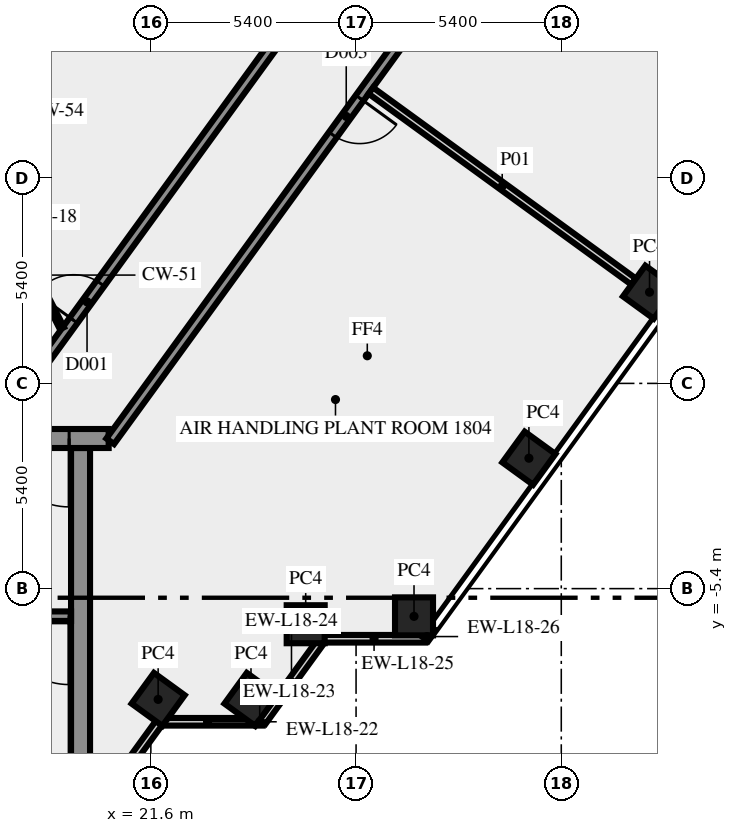
"""IFC4 building model, lengths in metres.
Left out: names, types, materials, properties, quantities, classifications, styles, units other than length and angle.
Written with IfcOpenShell. Run it as: python <this file> out.ifc"""

import sys

from ifc_helpers import new_model, si_unit, direction, frame, frame_2d, origin, origin_2d, place, context, subcontext, project, spatial, rectangle, extrude, element, fill, save


model = new_model("IFC4")
c1 = context("Model", 3, precision=1e-05, world=origin(), true_north=direction((0.0, 1.0)))
c2 = subcontext(c1, "Body", "Model", "MODEL_VIEW")
j1 = project(units=[si_unit("LENGTHUNIT", "METRE"), si_unit("PLANEANGLEUNIT", "RADIAN")], contexts=[c1])
p1 = place(None, origin())
s1 = spatial("IfcSite", under=j1, at=p1, CompositionType="ELEMENT")
p2 = place(p1, origin())
s2 = spatial("IfcBuilding", under=s1, at=p2, CompositionType="ELEMENT")
p3 = place(p2, frame((0.0, 0.0, 79.0)))
s3 = spatial("IfcBuildingStorey", under=s2, at=p3, CompositionType="ELEMENT", Elevation=79.0)
for number, where, z_axis, x_axis in (
    (1, (21.792, -8.315, 0.0), (0.0, 0.0, 1.0), (0.588, 0.809, 0.0)),
    (2, (24.235, -8.315, 0.0), (0.0, 0.0, 1.0), (0.588, 0.809, 0.0)),
    (3, (25.674, -6.337, 0.0), (0.0, 0.0, 1.0), (1.0, 0.0, 0.0)),
    (4, (28.525, -6.13, 0.0), (0.0, 0.0, 1.0), (1.0, 0.0, 0.0)),
    (5, (31.548, -1.969, 0.0), (0.0, 0.0, 1.0), (0.588, 0.809, 0.0)),
    (6, (34.722, 2.4, 0.0), (0.0, 0.0, 1.0), (0.588, 0.809, 0.0)),
):
    element("IfcColumn", number, at=place(p3, frame(where, z_axis=z_axis, x_axis=x_axis)), inside=s3, PredefinedType="COLUMN", context=c2, shape_type="SweptSolid", body=[
        extrude(rectangle(XDim=1.0, YDim=1.0, at=origin_2d()), origin(), (0.0, 0.0, 1.0), 5.65),
    ])
p4 = place(p3, frame((20.253, -11.083, 0.0), z_axis=(0.0, 0.0, 1.0), x_axis=(0.587766567315, 0.809030569476, 0.0)))
e7 = element("IfcWall", 7, at=p4, inside=s3, PredefinedType="SOLIDWALL", context=c2, shape_type="SweptSolid", body=[
    extrude(rectangle(XDim=2.688, YDim=0.2, at=frame_2d((1.344, 0.0))), origin(), (0.0, 0.0, 1.0), 5.65),
])
p5 = place(p3, frame((21.943, -8.904, 0.0), z_axis=(0.0, 0.0, 1.0), x_axis=(1.0, 0.0, 0.0)))
e8 = element("IfcWall", 8, at=p5, inside=s3, PredefinedType="SOLIDWALL", context=c2, shape_type="SweptSolid", body=[
    extrude(rectangle(XDim=2.298, YDim=0.2, at=frame_2d((1.149, 0.0))), origin(), (0.0, 0.0, 1.0), 5.65),
])
p6 = place(p3, frame((24.387, -8.904, 0.0), z_axis=(0.0, 0.0, 1.0), x_axis=(1.0, 0.0, 0.0)))
e9 = element("IfcWall", 9, at=p6, inside=s3, PredefinedType="SOLIDWALL", context=c2, shape_type="SweptSolid", body=[
    extrude(rectangle(XDim=0.156, YDim=0.2, at=frame_2d((0.078, 0.0))), origin(), (0.0, 0.0, 1.0), 5.65),
])
p7 = place(p3, frame((24.54, -8.899, 0.0), z_axis=(0.0, 0.0, 1.0), x_axis=(0.587700286833, 0.809078718578, 0.0)))
e10 = element("IfcWall", 10, at=p7, inside=s3, PredefinedType="SOLIDWALL", context=c2, shape_type="SweptSolid", body=[
    extrude(rectangle(XDim=2.587, YDim=0.2, at=frame_2d((1.293, 0.0))), origin(), (0.0, 0.0, 1.0), 5.65),
])
p8 = place(p3, frame((26.13, -6.719, 0.0), z_axis=(0.0, 0.0, 1.0), x_axis=(1.0, 0.0, 0.0)))
e11 = element("IfcWall", 11, at=p8, inside=s3, PredefinedType="SOLIDWALL", context=c2, shape_type="SweptSolid", body=[
    extrude(rectangle(XDim=2.688, YDim=0.2, at=frame_2d((1.344, 0.0))), origin(), (0.0, 0.0, 1.0), 5.65),
])
p9 = place(p3, frame((28.82, -6.724, 0.0), z_axis=(0.0, 0.0, 1.0), x_axis=(0.587611037135, 0.809143540441, 0.0)))
e12 = element("IfcWall", 12, at=p9, inside=s3, PredefinedType="SOLIDWALL", context=c2, shape_type="SweptSolid", body=[
    extrude(rectangle(XDim=0.155, YDim=0.2, at=frame_2d((0.078, 0.0))), origin(), (0.0, 0.0, 1.0), 5.65),
])
p10 = place(p3, frame((28.998, -6.48, 0.0), z_axis=(0.0, 0.0, 1.0), x_axis=(0.587785589252, 0.809016749559, 0.0)))
e13 = element("IfcWall", 13, at=p10, inside=s3, PredefinedType="SOLIDWALL", context=c2, shape_type="SweptSolid", body=[
    extrude(rectangle(XDim=28.654, YDim=0.2, at=frame_2d((14.327, 0.0))), origin(), (0.0, 0.0, 1.0), 5.65),
])
p11 = place(p3, frame((19.75, -10.5, 0.0), z_axis=(0.0, 0.0, 1.0), x_axis=(0.0, 1.0, 0.0)))
e14 = element("IfcWall", 14, at=p11, inside=s3, PredefinedType="SHEAR", context=c2, shape_type="SweptSolid", body=[
    extrude(rectangle(XDim=8.8, YDim=0.5, at=frame_2d((4.4, 0.0))), origin(), (0.0, 0.0, 1.0), 5.65),
])
p12 = place(p3, frame((19.5, -6.125, 0.0), z_axis=(0.0, 0.0, 1.0), x_axis=(-1.0, 0.0, 0.0)))
e15 = element("IfcWall", 15, at=p12, inside=s3, PredefinedType="SHEAR", context=c2, shape_type="SweptSolid", body=[
    extrude(rectangle(XDim=8.05, YDim=0.25, at=frame_2d((4.025, 0.0))), origin(), (0.0, 0.0, 1.0), 5.65),
])
p13 = place(p12, frame((0.05, 0.0, 0.0)))
e16 = element("IfcOpeningElement", 16, at=p13, cuts=e15, PredefinedType="OPENING", context=c2, shape_type="SweptSolid", body=[
    extrude(rectangle(XDim=1.8, YDim=2.1, at=frame_2d((0.9, 1.05))), frame((0.0, 0.135, 0.0), z_axis=(0.0, -1.0, 0.0), x_axis=(1.0, 0.0, 0.0)), (0.0, 0.0, 1.0), 0.27),
])
p14 = place(p3, frame((20.49, -1.45, 0.0), z_axis=(0.0, 0.0, 1.0), x_axis=(-1.0, 0.0, 0.0)))
e17 = element("IfcWall", 17, at=p14, inside=s3, PredefinedType="SHEAR", context=c2, shape_type="SweptSolid", body=[
    extrude(rectangle(XDim=40.98, YDim=0.5, at=frame_2d((20.49, 0.0))), origin(), (0.0, 0.0, 1.0), 5.65),
])
p15 = place(p14, frame((38.14, 0.0, 0.0)))
e18 = element("IfcOpeningElement", 18, at=p15, cuts=e17, PredefinedType="OPENING", context=c2, shape_type="SweptSolid", body=[
    extrude(rectangle(XDim=1.8, YDim=2.1, at=frame_2d((0.9, 1.05))), frame((0.0, 0.26, 0.0), z_axis=(0.0, -1.0, 0.0), x_axis=(1.0, 0.0, 0.0)), (0.0, 0.0, 1.0), 0.52),
])
p16 = place(p14, frame((36.728, 0.0, 0.0)))
e19 = element("IfcOpeningElement", 19, at=p16, cuts=e17, PredefinedType="OPENING", context=c2, shape_type="SweptSolid", body=[
    extrude(rectangle(XDim=0.8, YDim=2.1, at=frame_2d((0.4, 1.05))), frame((0.0, 0.26, 0.0), z_axis=(0.0, -1.0, 0.0), x_axis=(1.0, 0.0, 0.0)), (0.0, 0.0, 1.0), 0.52),
])
p17 = place(p14, frame((35.153, 0.0, 0.0)))
e20 = element("IfcOpeningElement", 20, at=p17, cuts=e17, PredefinedType="OPENING", context=c2, shape_type="SweptSolid", body=[
    extrude(rectangle(XDim=0.8, YDim=2.1, at=frame_2d((0.4, 1.05))), frame((0.0, 0.26, 0.0), z_axis=(0.0, -1.0, 0.0), x_axis=(1.0, 0.0, 0.0)), (0.0, 0.0, 1.0), 0.52),
])
p18 = place(p14, frame((32.94, 0.0, 0.0)))
e21 = element("IfcOpeningElement", 21, at=p18, cuts=e17, PredefinedType="OPENING", context=c2, shape_type="SweptSolid", body=[
    extrude(rectangle(XDim=0.9, YDim=2.1, at=frame_2d((0.45, 1.05))), frame((0.0, 0.26, 0.0), z_axis=(0.0, -1.0, 0.0), x_axis=(1.0, 0.0, 0.0)), (0.0, 0.0, 1.0), 0.52),
])
p19 = place(p14, frame((21.765, 0.0, 0.0)))
e22 = element("IfcOpeningElement", 22, at=p19, cuts=e17, PredefinedType="OPENING", context=c2, shape_type="SweptSolid", body=[
    extrude(rectangle(XDim=2.0, YDim=2.1, at=frame_2d((1.0, 1.05))), frame((0.0, 0.26, 0.0), z_axis=(0.0, -1.0, 0.0), x_axis=(1.0, 0.0, 0.0)), (0.0, 0.0, 1.0), 0.52),
])
p20 = place(p14, frame((7.14, 0.0, 0.0)))
e23 = element("IfcOpeningElement", 23, at=p20, cuts=e17, PredefinedType="OPENING", context=c2, shape_type="SweptSolid", body=[
    extrude(rectangle(XDim=0.9, YDim=2.1, at=frame_2d((0.45, 1.05))), frame((0.0, 0.26, 0.0), z_axis=(0.0, -1.0, 0.0), x_axis=(1.0, 0.0, 0.0)), (0.0, 0.0, 1.0), 0.52),
])
p21 = place(p14, frame((4.19, 0.0, 0.0)))
e24 = element("IfcOpeningElement", 24, at=p21, cuts=e17, PredefinedType="OPENING", context=c2, shape_type="SweptSolid", body=[
    extrude(rectangle(XDim=0.9, YDim=2.1, at=frame_2d((0.45, 1.05))), frame((0.0, 0.26, 0.0), z_axis=(0.0, -1.0, 0.0), x_axis=(1.0, 0.0, 0.0)), (0.0, 0.0, 1.0), 0.52),
])
p22 = place(p14, frame((1.04, 0.0, 0.0)))
e25 = element("IfcOpeningElement", 25, at=p22, cuts=e17, PredefinedType="OPENING", context=c2, shape_type="SweptSolid", body=[
    extrude(rectangle(XDim=1.8, YDim=2.1, at=frame_2d((0.9, 1.05))), frame((0.0, 0.26, 0.0), z_axis=(0.0, -1.0, 0.0), x_axis=(1.0, 0.0, 0.0)), (0.0, 0.0, 1.0), 0.52),
])
p23 = place(p3, frame((40.584, 26.078, 0.0), z_axis=(0.0, 0.0, 1.0), x_axis=(-0.587782727964, -0.809018828401, 0.0)))
e26 = element("IfcWall", 26, at=p23, inside=s3, PredefinedType="SOLIDWALL", context=c2, shape_type="SweptSolid", body=[
    extrude(rectangle(XDim=34.117, YDim=0.25, at=frame_2d((17.058, 0.0))), origin(), (0.0, 0.0, 1.0), 5.65),
])
p24 = place(p23, frame((22.951, 0.0, 0.0)))
e27 = element("IfcOpeningElement", 27, at=p24, cuts=e26, PredefinedType="OPENING", context=c2, shape_type="SweptSolid", body=[
    extrude(rectangle(XDim=1.2, YDim=2.1, at=frame_2d((0.6, 1.05))), frame((0.0, 0.135, 0.0), z_axis=(0.0, -1.0, 0.0), x_axis=(1.0, 0.0, 0.0)), (0.0, 0.0, 1.0), 0.27),
])
p25 = place(p23, frame((10.749, 0.0, 0.0)))
e28 = element("IfcOpeningElement", 28, at=p25, cuts=e26, PredefinedType="OPENING", context=c2, shape_type="SweptSolid", body=[
    extrude(rectangle(XDim=1.8, YDim=2.1, at=frame_2d((0.9, 1.05))), frame((0.0, 0.135, 0.0), z_axis=(0.0, -1.0, 0.0), x_axis=(1.0, 0.0, 0.0)), (0.0, 0.0, 1.0), 0.27),
])
p26 = place(p3, frame((17.545, -1.125, 0.0), z_axis=(0.0, 0.0, 1.0), x_axis=(0.587787785895, 0.809015153599, 0.0)))
e29 = element("IfcWall", 29, at=p26, inside=s3, PredefinedType="SOLIDWALL", context=c2, shape_type="SweptSolid", body=[
    extrude(rectangle(XDim=35.549, YDim=0.25, at=frame_2d((17.775, 0.0))), origin(), (0.0, 0.0, 1.0), 5.65),
])
p27 = place(p26, frame((33.303, 0.0, 0.0)))
e30 = element("IfcOpeningElement", 30, at=p27, cuts=e29, PredefinedType="OPENING", context=c2, shape_type="SweptSolid", body=[
    extrude(rectangle(XDim=1.2, YDim=2.1, at=frame_2d((0.6, 1.05))), frame((0.0, 0.135, 0.0), z_axis=(0.0, -1.0, 0.0), x_axis=(1.0, 0.0, 0.0)), (0.0, 0.0, 1.0), 0.27),
])
p28 = place(p26, frame((3.442, 0.0, 0.0)))
e31 = element("IfcOpeningElement", 31, at=p28, cuts=e29, PredefinedType="OPENING", context=c2, shape_type="SweptSolid", body=[
    extrude(rectangle(XDim=1.2, YDim=2.1, at=frame_2d((0.6, 1.05))), frame((0.0, 0.135, 0.0), z_axis=(0.0, -1.0, 0.0), x_axis=(1.0, 0.0, 0.0)), (0.0, 0.0, 1.0), 0.27),
])
p29 = place(p3, frame((34.302, 2.681, 0.0), z_axis=(0.0, 0.0, 1.0), x_axis=(-0.809031283368, 0.587765584678, 0.0)))
e32 = element("IfcWall", 32, at=p29, inside=s3, PredefinedType="SOLIDWALL", context=c2, shape_type="SweptSolid", body=[
    extrude(rectangle(XDim=8.545, YDim=0.2, at=frame_2d((4.272, 0.0))), origin(), (0.0, 0.0, 1.0), 5.65),
])
p30 = place(p3, frame((18.0, 3.925, 0.0), z_axis=(0.0, 0.0, 1.0), x_axis=(0.453950796792, -0.891026752736, 0.0)))
e33 = element("IfcWall", 33, at=p30, inside=s3, PredefinedType="PARTITIONING", context=c2, shape_type="SweptSolid", body=[
    extrude(rectangle(XDim=2.778, YDim=0.12, at=frame_2d((1.389, 0.0))), origin(), (0.0, 0.0, 1.0), 5.65),
])
p31 = place(p13, origin())
e34 = element("IfcDoor", 34, at=p31, inside=s3, OperationType="DOUBLE_DOOR_SINGLE_SWING", PredefinedType="DOOR", context=c2, shape_type="SweptSolid", body=[
    extrude(rectangle(XDim=1.8, YDim=2.1, at=frame_2d((0.9, 1.05))), frame((0.0, 0.025, 0.0), z_axis=(0.0, -1.0, 0.0), x_axis=(1.0, 0.0, 0.0)), (0.0, 0.0, 1.0), 0.05),
])
fill(e16, e34)
p32 = place(p22, origin())
e35 = element("IfcDoor", 35, at=p32, inside=s3, OperationType="DOUBLE_DOOR_SINGLE_SWING", PredefinedType="DOOR", context=c2, shape_type="SweptSolid", body=[
    extrude(rectangle(XDim=1.8, YDim=2.1, at=frame_2d((0.9, 1.05))), frame((0.0, 0.025, 0.0), z_axis=(0.0, -1.0, 0.0), x_axis=(1.0, 0.0, 0.0)), (0.0, 0.0, 1.0), 0.05),
])
fill(e25, e35)
p33 = place(p24, origin())
e36 = element("IfcDoor", 36, at=p33, inside=s3, OperationType="SINGLE_SWING_LEFT", PredefinedType="DOOR", context=c2, shape_type="SweptSolid", body=[
    extrude(rectangle(XDim=1.2, YDim=2.1, at=frame_2d((0.6, 1.05))), frame((0.0, 0.025, 0.0), z_axis=(0.0, -1.0, 0.0), x_axis=(1.0, 0.0, 0.0)), (0.0, 0.0, 1.0), 0.05),
])
fill(e27, e36)
p34 = place(p28, origin())
e37 = element("IfcDoor", 37, at=p34, inside=s3, OperationType="SINGLE_SWING_LEFT", PredefinedType="DOOR", context=c2, shape_type="SweptSolid", body=[
    extrude(rectangle(XDim=1.2, YDim=2.1, at=frame_2d((0.6, 1.05))), frame((0.0, 0.025, 0.0), z_axis=(0.0, -1.0, 0.0), x_axis=(1.0, 0.0, 0.0)), (0.0, 0.0, 1.0), 0.05),
])
fill(e31, e37)
save(model, sys.argv[1])
